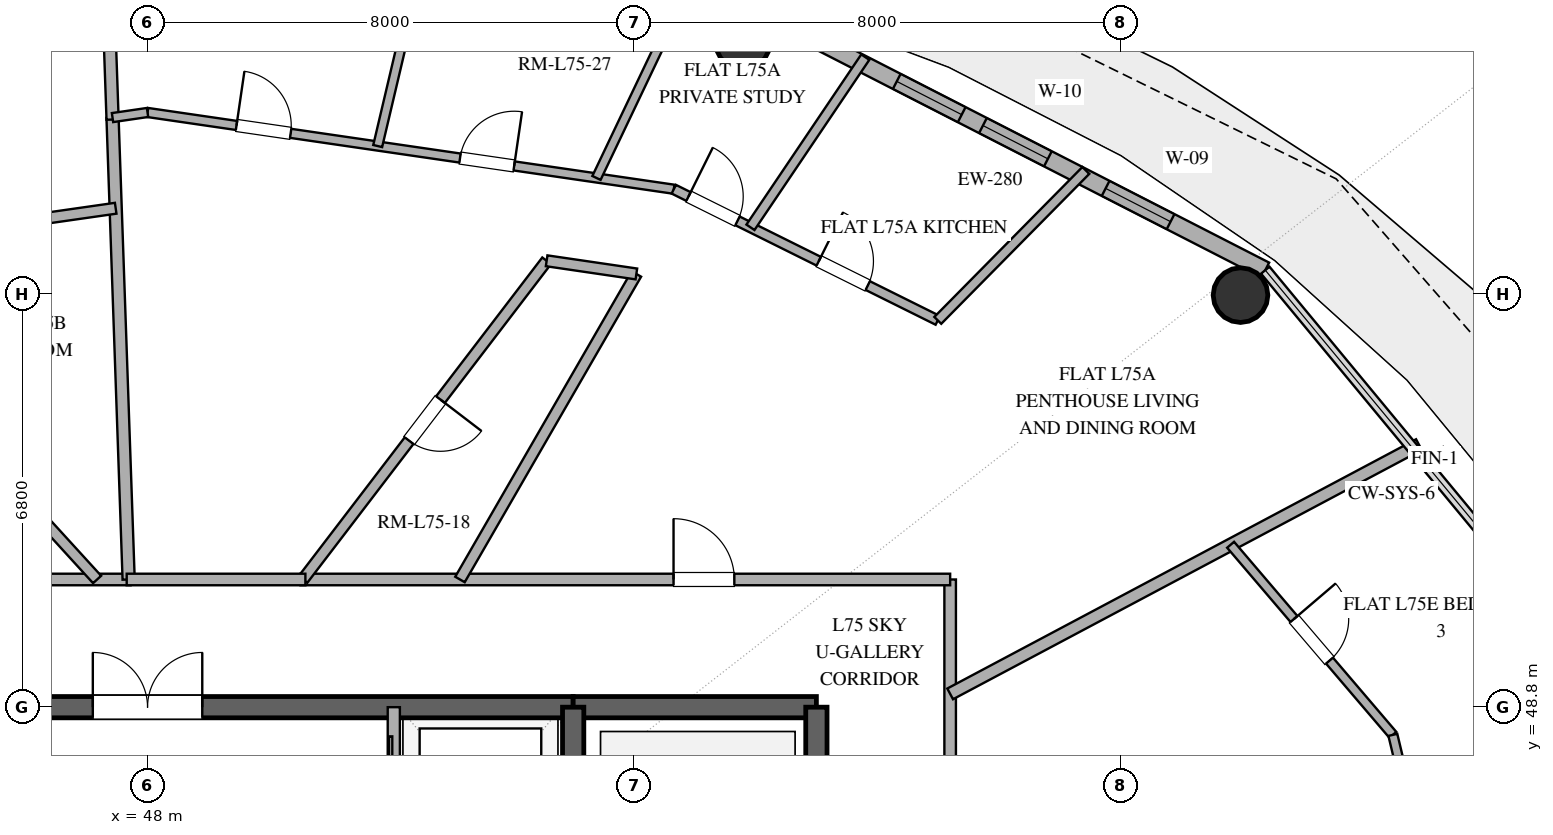
"""IFC4 building model, lengths in metres.
Left out: names, types, materials, properties, quantities, classifications, styles, units other than length and angle.
Written with IfcOpenShell. Run it as: python <this file> out.ifc"""

import sys

from ifc_helpers import new_model, si_unit, direction, frame, frame_2d, origin, origin_2d, place, context, subcontext, project, spatial, rectangle, hollow_circle, extrude, element, fill, save


model = new_model("IFC4")
c1 = context("Model", 3, precision=1e-05, world=origin(), true_north=direction((0.0, 1.0)))
c2 = subcontext(c1, "Body", "Model", "MODEL_VIEW")
j1 = project(units=[si_unit("LENGTHUNIT", "METRE"), si_unit("PLANEANGLEUNIT", "RADIAN")], contexts=[c1])
p1 = place(None, origin())
s1 = spatial("IfcSite", under=j1, at=p1, CompositionType="ELEMENT")
p2 = place(p1, origin())
s2 = spatial("IfcBuilding", under=s1, at=p2, CompositionType="ELEMENT")
p3 = place(p2, frame((0.0, 0.0, 291.0)))
s3 = spatial("IfcBuildingStorey", under=s2, at=p3, CompositionType="ELEMENT", Elevation=291.0)
p4 = place(p3, frame((41.0, 48.8, 0.0), z_axis=(0.0, 0.0, 1.0), x_axis=(1.0, 0.0, 0.0)))
e1 = element("IfcWall", 1, at=p4, inside=s3, PredefinedType="SHEAR", context=c2, shape_type="SweptSolid", body=[
    extrude(rectangle(XDim=14.0, YDim=0.35, at=frame_2d((7.0, 0.0))), origin(), (0.0, 0.0, 1.0), 3.37),
])
p5 = place(p4, frame((6.1, 0.0, 0.0)))
e2 = element("IfcOpeningElement", 2, at=p5, cuts=e1, PredefinedType="OPENING", context=c2, shape_type="SweptSolid", body=[
    extrude(rectangle(XDim=1.8, YDim=2.25, at=frame_2d((0.9, 1.125))), frame((0.0, 0.185, 0.0), z_axis=(0.0, -1.0, 0.0), x_axis=(1.0, 0.0, 0.0)), (0.0, 0.0, 1.0), 0.37),
])
p6 = place(p3, frame((55.0, 48.8, 0.0), z_axis=(0.0, 0.0, 1.0), x_axis=(1.0, 0.0, 0.0)))
e3 = element("IfcWall", 3, at=p6, inside=s3, PredefinedType="SHEAR", context=c2, shape_type="SweptSolid", body=[
    extrude(rectangle(XDim=4.0, YDim=0.35, at=frame_2d((2.0, 0.0))), origin(), (0.0, 0.0, 1.0), 3.37),
])
p7 = place(p3, frame((59.0, 35.2, 0.0), z_axis=(0.0, 0.0, 1.0), x_axis=(0.0, 1.0, 0.0)))
e4 = element("IfcWall", 4, at=p7, inside=s3, PredefinedType="SHEAR", context=c2, shape_type="SweptSolid", body=[
    extrude(rectangle(XDim=13.6, YDim=0.35, at=frame_2d((6.8, 0.0))), origin(), (0.0, 0.0, 1.0), 3.37),
])
p8 = place(p7, frame((1.5, 0.0, 0.0)))
e5 = element("IfcOpeningElement", 5, at=p8, cuts=e4, PredefinedType="OPENING", context=c2, shape_type="SweptSolid", body=[
    extrude(rectangle(XDim=1.2, YDim=2.15, at=frame_2d((0.6, 1.075))), frame((0.0, 0.185, 0.0), z_axis=(0.0, -1.0, 0.0), x_axis=(1.0, 0.0, 0.0)), (0.0, 0.0, 1.0), 0.37),
])
p9 = place(p3, frame((55.0, 35.2, 0.0), z_axis=(0.0, 0.0, 1.0), x_axis=(0.0, 1.0, 0.0)))
e6 = element("IfcWall", 6, at=p9, inside=s3, PredefinedType="SHEAR", context=c2, shape_type="SweptSolid", body=[
    extrude(rectangle(XDim=13.6, YDim=0.35, at=frame_2d((6.8, 0.0))), origin(), (0.0, 0.0, 1.0), 3.37),
])
p10 = place(p9, frame((1.15, 0.0, 0.0)))
e7 = element("IfcOpeningElement", 7, at=p10, cuts=e6, PredefinedType="OPENING", context=c2, shape_type="SweptSolid", body=[
    extrude(rectangle(XDim=1.1, YDim=2.2, at=frame_2d((0.55, 1.1))), frame((0.0, 0.185, 0.0), z_axis=(0.0, -1.0, 0.0), x_axis=(1.0, 0.0, 0.0)), (0.0, 0.0, 1.0), 0.37),
])
for number, where, z_axis, x_axis in (
    (8, (65.975, 55.576, 0.0), (0.0, 0.0, 1.0), (1.0, 0.0, 0.0)),
    (9, (57.791, 59.739, 0.0), (0.0, 0.0, 1.0), (1.0, 0.0, 0.0)),
):
    element("IfcColumn", number, at=place(p3, frame(where, z_axis=z_axis, x_axis=x_axis)), inside=s3, PredefinedType="COLUMN", context=c2, shape_type="SweptSolid", body=[
        extrude(hollow_circle(Radius=0.45, WallThickness=0.025, at=origin_2d()), origin(), (0.0, 0.0, 1.0), 3.37),
    ])
p11 = place(p3, frame((66.383, 55.987, 0.0), z_axis=(0.0, 0.0, 1.0), x_axis=(-0.890007394051, 0.455946091699, 0.0)))
e10 = element("IfcWall", 10, at=p11, inside=s3, PredefinedType="SOLIDWALL", context=c2, shape_type="SweptSolid", body=[
    extrude(rectangle(XDim=9.404, YDim=0.28, at=frame_2d((4.702, 0.0))), origin(), (0.0, 0.0, 1.0), 3.37),
])
p12 = place(p11, frame((1.75, 0.0, 0.85)))
e11 = element("IfcOpeningElement", 11, at=p12, cuts=e10, PredefinedType="OPENING", context=c2, shape_type="SweptSolid", body=[
    extrude(rectangle(XDim=1.2, YDim=1.8, at=frame_2d((0.6, 0.9))), frame((0.0, 0.15, 0.0), z_axis=(0.0, -1.0, 0.0), x_axis=(1.0, 0.0, 0.0)), (0.0, 0.0, 1.0), 0.3),
])
p13 = place(p11, frame((4.017, 0.0, 0.85)))
e12 = element("IfcOpeningElement", 12, at=p13, cuts=e10, PredefinedType="OPENING", context=c2, shape_type="SweptSolid", body=[
    extrude(rectangle(XDim=1.2, YDim=1.6, at=frame_2d((0.6, 0.8))), frame((0.0, 0.15, 0.0), z_axis=(0.0, -1.0, 0.0), x_axis=(1.0, 0.0, 0.0)), (0.0, 0.0, 1.0), 0.3),
])
p14 = place(p11, frame((5.609, 0.0, 0.85)))
e13 = element("IfcOpeningElement", 13, at=p14, cuts=e10, PredefinedType="OPENING", context=c2, shape_type="SweptSolid", body=[
    extrude(rectangle(XDim=1.2, YDim=1.6, at=frame_2d((0.6, 0.8))), frame((0.0, 0.15, 0.0), z_axis=(0.0, -1.0, 0.0), x_axis=(1.0, 0.0, 0.0)), (0.0, 0.0, 1.0), 0.3),
])
p15 = place(p3, frame((52.05, 40.98, 0.0), z_axis=(0.0, 0.0, 1.0), x_axis=(0.0, 1.0, 0.0)))
e14 = element("IfcWall", 14, at=p15, inside=s3, PredefinedType="SOLIDWALL", context=c2, shape_type="SweptSolid", body=[
    extrude(rectangle(XDim=7.82, YDim=0.2, at=frame_2d((3.91, 0.0))), origin(), (0.0, 0.0, 1.0), 2.73),
])
p16 = place(p15, frame((0.65, 0.0, 0.0)))
e15 = element("IfcOpeningElement", 15, at=p16, cuts=e14, PredefinedType="OPENING", context=c2, shape_type="SweptSolid", body=[
    extrude(rectangle(XDim=1.1, YDim=2.2, at=frame_2d((0.55, 1.1))), frame((0.0, 0.11, 0.0), z_axis=(0.0, -1.0, 0.0), x_axis=(1.0, 0.0, 0.0)), (0.0, 0.0, 1.0), 0.22),
])
p17 = place(p15, frame((3.05, 0.0, 0.0)))
e16 = element("IfcOpeningElement", 16, at=p17, cuts=e14, PredefinedType="OPENING", context=c2, shape_type="SweptSolid", body=[
    extrude(rectangle(XDim=1.1, YDim=2.2, at=frame_2d((0.55, 1.1))), frame((0.0, 0.11, 0.0), z_axis=(0.0, -1.0, 0.0), x_axis=(1.0, 0.0, 0.0)), (0.0, 0.0, 1.0), 0.22),
])
p18 = place(p15, frame((5.6, 0.0, 0.0)))
e17 = element("IfcOpeningElement", 17, at=p18, cuts=e14, PredefinedType="OPENING", context=c2, shape_type="SweptSolid", body=[
    extrude(rectangle(XDim=1.2, YDim=2.2, at=frame_2d((0.6, 1.1))), frame((0.0, 0.11, 0.0), z_axis=(0.0, -1.0, 0.0), x_axis=(1.0, 0.0, 0.0)), (0.0, 0.0, 1.0), 0.22),
])
p19 = place(p3, frame((61.2, 50.9, 0.0), z_axis=(0.0, 0.0, 1.0), x_axis=(0.0, -1.0, 0.0)))
e18 = element("IfcWall", 18, at=p19, inside=s3, PredefinedType="PARTITIONING", context=c2, shape_type="SweptSolid", body=[
    extrude(rectangle(XDim=16.9, YDim=0.19, at=frame_2d((8.45, 0.0))), origin(), (0.0, 0.0, 1.0), 2.73),
])
p20 = place(p19, frame((8.873, 0.0, 0.0)))
e19 = element("IfcOpeningElement", 19, at=p20, cuts=e18, PredefinedType="OPENING", context=c2, shape_type="SweptSolid", body=[
    extrude(rectangle(XDim=1.0, YDim=2.2, at=frame_2d((0.5, 1.1))), frame((0.0, 0.105, 0.0), z_axis=(0.0, -1.0, 0.0), x_axis=(1.0, 0.0, 0.0)), (0.0, 0.0, 1.0), 0.21),
])
p21 = place(p3, frame((34.8, 50.9, 0.0), z_axis=(0.0, 0.0, 1.0), x_axis=(1.0, 0.0, 0.0)))
e20 = element("IfcWall", 20, at=p21, inside=s3, PredefinedType="PARTITIONING", context=c2, shape_type="SweptSolid", body=[
    extrude(rectangle(XDim=12.921, YDim=0.19, at=frame_2d((6.46, 0.0))), origin(), (0.0, 0.0, 1.0), 2.73),
])
p22 = place(p21, frame((5.707, 0.0, 0.0)))
e21 = element("IfcOpeningElement", 21, at=p22, cuts=e20, PredefinedType="OPENING", context=c2, shape_type="SweptSolid", body=[
    extrude(rectangle(XDim=1.0, YDim=2.2, at=frame_2d((0.5, 1.1))), frame((0.0, 0.105, 0.0), z_axis=(0.0, -1.0, 0.0), x_axis=(1.0, 0.0, 0.0)), (0.0, 0.0, 1.0), 0.21),
])
p23 = place(p3, frame((50.515, 50.9, 0.0), z_axis=(0.0, 0.0, 1.0), x_axis=(1.0, 0.0, 0.0)))
e22 = element("IfcWall", 22, at=p23, inside=s3, PredefinedType="PARTITIONING", context=c2, shape_type="SweptSolid", body=[
    extrude(rectangle(XDim=10.685, YDim=0.19, at=frame_2d((5.342, 0.0))), origin(), (0.0, 0.0, 1.0), 2.73),
])
p24 = place(p23, frame((6.135, 0.0, 0.0)))
e23 = element("IfcOpeningElement", 23, at=p24, cuts=e22, PredefinedType="OPENING", context=c2, shape_type="SweptSolid", body=[
    extrude(rectangle(XDim=1.0, YDim=2.2, at=frame_2d((0.5, 1.1))), frame((0.0, 0.105, 0.0), z_axis=(0.0, -1.0, 0.0), x_axis=(1.0, 0.0, 0.0)), (0.0, 0.0, 1.0), 0.21),
])
p25 = place(p3, frame((42.278, 56.261, 0.0), z_axis=(0.0, 0.0, 1.0), x_axis=(0.674096276867, -0.73864349284, 0.0)))
e24 = element("IfcWall", 24, at=p25, inside=s3, PredefinedType="PLUMBINGWALL", context=c2, shape_type="SweptSolid", body=[
    extrude(rectangle(XDim=7.258, YDim=0.18, at=frame_2d((3.629, 0.0))), origin(), (0.0, 0.0, 1.0), 2.73),
])
p26 = place(p25, frame((3.204, 0.0, 0.0)))
e25 = element("IfcOpeningElement", 25, at=p26, cuts=e24, PredefinedType="OPENING", context=c2, shape_type="SweptSolid", body=[
    extrude(rectangle(XDim=0.85, YDim=2.1, at=frame_2d((0.425, 1.05))), frame((0.0, 0.1, 0.0), z_axis=(0.0, -1.0, 0.0), x_axis=(1.0, 0.0, 0.0)), (0.0, 0.0, 1.0), 0.2),
])
p27 = place(p3, frame((54.564, 56.141, 0.0), z_axis=(0.0, 0.0, 1.0), x_axis=(-0.607456974677, -0.794352581614, 0.0)))
e26 = element("IfcWall", 26, at=p27, inside=s3, PredefinedType="PLUMBINGWALL", context=c2, shape_type="SweptSolid", body=[
    extrude(rectangle(XDim=6.598, YDim=0.18, at=frame_2d((3.299, 0.0))), origin(), (0.0, 0.0, 1.0), 2.73),
])
p28 = place(p27, frame((2.874, 0.0, 0.0)))
e27 = element("IfcOpeningElement", 27, at=p28, cuts=e26, PredefinedType="OPENING", context=c2, shape_type="SweptSolid", body=[
    extrude(rectangle(XDim=0.85, YDim=2.1, at=frame_2d((0.425, 1.05))), frame((0.0, 0.1, 0.0), z_axis=(0.0, -1.0, 0.0), x_axis=(1.0, 0.0, 0.0)), (0.0, 0.0, 1.0), 0.2),
])
p29 = place(p3, frame((47.689, 50.9, 0.0), z_axis=(0.0, 0.0, 1.0), x_axis=(-0.034882659784, 0.999391414835, 0.0)))
e28 = element("IfcWall", 28, at=p29, inside=s3, PredefinedType="PARTITIONING", context=c2, shape_type="SweptSolid", body=[
    extrude(rectangle(XDim=7.601, YDim=0.2, at=frame_2d((3.8, 0.0))), origin(), (0.0, 0.0, 1.0), 2.73),
])
p30 = place(p3, frame((53.138, 50.9, 0.0), z_axis=(0.0, 0.0, 1.0), x_axis=(0.499985927882, 0.866033528173, 0.0)))
e29 = element("IfcWall", 29, at=p30, inside=s3, PredefinedType="PLUMBINGWALL", context=c2, shape_type="SweptSolid", body=[
    extrude(rectangle(XDim=5.802, YDim=0.18, at=frame_2d((2.901, 0.0))), origin(), (0.0, 0.0, 1.0), 2.73),
])
p31 = place(p3, frame((68.909, 53.118, 0.0), z_axis=(0.0, 0.0, 1.0), x_axis=(-0.882939716422, -0.469486375909, 0.0)))
e30 = element("IfcWall", 30, at=p31, inside=s3, PredefinedType="PARTITIONING", context=c2, shape_type="SweptSolid", body=[
    extrude(rectangle(XDim=8.732, YDim=0.2, at=frame_2d((4.366, 0.0))), origin(), (0.0, 0.0, 1.0), 2.73),
])
p32 = place(p3, frame((47.476, 57.005, 0.0), z_axis=(0.0, 0.0, 1.0), x_axis=(-0.989922511169, -0.141610105153, 0.0)))
e31 = element("IfcWall", 31, at=p32, inside=s3, PredefinedType="PLUMBINGWALL", context=c2, shape_type="SweptSolid", body=[
    extrude(rectangle(XDim=5.251, YDim=0.18, at=frame_2d((2.626, 0.0))), origin(), (0.0, 0.0, 1.0), 2.73),
])
p33 = place(p3, frame((65.812, 51.471, 0.0), z_axis=(0.0, 0.0, 1.0), x_axis=(0.649224667474, -0.760596694145, 0.0)))
e32 = element("IfcWall", 32, at=p33, inside=s3, PredefinedType="PARTITIONING", context=c2, shape_type="SweptSolid", body=[
    extrude(rectangle(XDim=4.11, YDim=0.15, at=frame_2d((2.055, 0.0))), origin(), (0.0, 0.0, 1.0), 2.73),
])
p34 = place(p33, frame((1.605, 0.0, 0.0)))
e33 = element("IfcOpeningElement", 33, at=p34, cuts=e32, PredefinedType="OPENING", context=c2, shape_type="SweptSolid", body=[
    extrude(rectangle(XDim=0.9, YDim=2.1, at=frame_2d((0.45, 1.05))), frame((0.0, 0.085, 0.0), z_axis=(0.0, -1.0, 0.0), x_axis=(1.0, 0.0, 0.0)), (0.0, 0.0, 1.0), 0.17),
])
p35 = place(p3, frame((48.0, 58.58, 0.0), z_axis=(0.0, 0.0, 1.0), x_axis=(0.989536136377, -0.144285254977, 0.0)))
e34 = element("IfcWall", 34, at=p35, inside=s3, PredefinedType="PARTITIONING", context=c2, shape_type="SweptSolid", body=[
    extrude(rectangle(XDim=8.746, YDim=0.15, at=frame_2d((4.373, 0.0))), origin(), (0.0, 0.0, 1.0), 2.73),
])
p36 = place(p35, frame((1.479, 0.0, 0.0)))
e35 = element("IfcOpeningElement", 35, at=p36, cuts=e34, PredefinedType="OPENING", context=c2, shape_type="SweptSolid", body=[
    extrude(rectangle(XDim=0.9, YDim=2.1, at=frame_2d((0.45, 1.05))), frame((0.0, 0.085, 0.0), z_axis=(0.0, -1.0, 0.0), x_axis=(1.0, 0.0, 0.0)), (0.0, 0.0, 1.0), 0.17),
])
p37 = place(p35, frame((5.193, 0.0, 0.0)))
e36 = element("IfcOpeningElement", 36, at=p37, cuts=e34, PredefinedType="OPENING", context=c2, shape_type="SweptSolid", body=[
    extrude(rectangle(XDim=0.9, YDim=2.1, at=frame_2d((0.45, 1.05))), frame((0.0, 0.085, 0.0), z_axis=(0.0, -1.0, 0.0), x_axis=(1.0, 0.0, 0.0)), (0.0, 0.0, 1.0), 0.17),
])
p38 = place(p3, frame((68.481, 48.345, 0.0), z_axis=(0.0, 0.0, 1.0), x_axis=(0.232298462197, -0.972644551962, 0.0)))
e37 = element("IfcWall", 37, at=p38, inside=s3, PredefinedType="PARTITIONING", context=c2, shape_type="SweptSolid", body=[
    extrude(rectangle(XDim=6.523, YDim=0.15, at=frame_2d((3.262, 0.0))), origin(), (0.0, 0.0, 1.0), 2.73),
])
p39 = place(p3, frame((56.655, 57.318, 0.0), z_axis=(0.0, 0.0, 1.0), x_axis=(0.895572412961, -0.44491578208, 0.0)))
e38 = element("IfcWall", 38, at=p39, inside=s3, PredefinedType="PLUMBINGWALL", context=c2, shape_type="SweptSolid", body=[
    extrude(rectangle(XDim=4.848, YDim=0.16, at=frame_2d((2.424, 0.0))), origin(), (0.0, 0.0, 1.0), 2.73),
])
p40 = place(p39, frame((2.662, 0.0, 0.0)))
e39 = element("IfcOpeningElement", 39, at=p40, cuts=e38, PredefinedType="OPENING", context=c2, shape_type="SweptSolid", body=[
    extrude(rectangle(XDim=0.9, YDim=2.1, at=frame_2d((0.45, 1.05))), frame((0.0, 0.09, 0.0), z_axis=(0.0, -1.0, 0.0), x_axis=(1.0, 0.0, 0.0)), (0.0, 0.0, 1.0), 0.18),
])
p41 = place(p39, frame((0.27, 0.0, 0.0)))
e40 = element("IfcOpeningElement", 40, at=p41, cuts=e38, PredefinedType="OPENING", context=c2, shape_type="SweptSolid", body=[
    extrude(rectangle(XDim=0.9, YDim=2.1, at=frame_2d((0.45, 1.05))), frame((0.0, 0.09, 0.0), z_axis=(0.0, -1.0, 0.0), x_axis=(1.0, 0.0, 0.0)), (0.0, 0.0, 1.0), 0.18),
])
p42 = place(p3, frame((60.997, 55.161, 0.0), z_axis=(0.0, 0.0, 1.0), x_axis=(0.702618919802, 0.711566338113, 0.0)))
e41 = element("IfcWall", 41, at=p42, inside=s3, PredefinedType="PLUMBINGWALL", context=c2, shape_type="SweptSolid", body=[
    extrude(rectangle(XDim=3.465, YDim=0.16, at=frame_2d((1.733, 0.0))), origin(), (0.0, 0.0, 1.0), 2.73),
])
p43 = place(p3, frame((56.842, 60.566, 0.0), z_axis=(0.0, 0.0, 1.0), x_axis=(-0.429975480416, -0.902840565239, 0.0)))
e42 = element("IfcWall", 42, at=p43, inside=s3, PredefinedType="PARTITIONING", context=c2, shape_type="SweptSolid", body=[
    extrude(rectangle(XDim=3.393, YDim=0.15, at=frame_2d((1.696, 0.0))), origin(), (0.0, 0.0, 1.0), 2.73),
])
p44 = place(p3, frame((59.804, 59.49, 0.0), z_axis=(0.0, 0.0, 1.0), x_axis=(-0.559397095435, -0.828899806743, 0.0)))
e43 = element("IfcWall", 43, at=p44, inside=s3, PredefinedType="PLUMBINGWALL", context=c2, shape_type="SweptSolid", body=[
    extrude(rectangle(XDim=3.376, YDim=0.16, at=frame_2d((1.688, 0.0))), origin(), (0.0, 0.0, 1.0), 2.73),
])
p45 = place(p3, frame((47.309, 61.797, 0.0), z_axis=(0.0, 0.0, 1.0), x_axis=(0.034921182562, -0.999390069497, 0.0)))
e44 = element("IfcWall", 44, at=p45, inside=s3, PredefinedType="PARTITIONING", context=c2, shape_type="SweptSolid", body=[
    extrude(rectangle(XDim=3.335, YDim=0.2, at=frame_2d((1.667, 0.0))), origin(), (0.0, 0.0, 1.0), 2.73),
])
p46 = place(p3, frame((51.785, 58.028, 0.0), z_axis=(0.0, 0.0, 1.0), x_axis=(0.2298279545, 0.973231273301, 0.0)))
e45 = element("IfcWall", 45, at=p46, inside=s3, PredefinedType="PARTITIONING", context=c2, shape_type="SweptSolid", body=[
    extrude(rectangle(XDim=3.278, YDim=0.15, at=frame_2d((1.639, 0.0))), origin(), (0.0, 0.0, 1.0), 2.73),
])
p47 = place(p3, frame((47.657, 50.9, 0.0), z_axis=(0.0, 0.0, 1.0), x_axis=(1.0, 0.0, 0.0)))
e46 = element("IfcWall", 46, at=p47, inside=s3, PredefinedType="PARTITIONING", context=c2, shape_type="SweptSolid", body=[
    extrude(rectangle(XDim=2.939, YDim=0.19, at=frame_2d((1.469, 0.0))), origin(), (0.0, 0.0, 1.0), 2.73),
])
p48 = place(p3, frame((56.039, 55.925, 0.0), z_axis=(0.0, 0.0, 1.0), x_axis=(-0.989402061703, 0.14520179165, 0.0)))
e47 = element("IfcWall", 47, at=p48, inside=s3, PredefinedType="PLUMBINGWALL", context=c2, shape_type="SweptSolid", body=[
    extrude(rectangle(XDim=1.491, YDim=0.18, at=frame_2d((0.746, 0.0))), origin(), (0.0, 0.0, 1.0), 2.73),
])
p49 = place(p3, frame((47.424, 58.496, 0.0), z_axis=(0.0, 0.0, 1.0), x_axis=(0.989534228924, 0.144298336053, 0.0)))
e48 = element("IfcWall", 48, at=p49, inside=s3, PredefinedType="PARTITIONING", context=c2, shape_type="SweptSolid", body=[
    extrude(rectangle(XDim=0.582, YDim=0.15, at=frame_2d((0.291, 0.0))), origin(), (0.0, 0.0, 1.0), 2.73),
])
p50 = place(p12, origin())
e49 = element("IfcWindow", 49, at=p50, inside=s3, PartitioningType="SINGLE_PANEL", PredefinedType="WINDOW", context=c2, shape_type="SweptSolid", body=[
    extrude(rectangle(XDim=1.2, YDim=1.8, at=frame_2d((0.6, 0.9))), frame((0.0, 0.03, 0.0), z_axis=(0.0, -1.0, 0.0), x_axis=(1.0, 0.0, 0.0)), (0.0, 0.0, 1.0), 0.06),
])
fill(e11, e49)
p51 = place(p13, origin())
e50 = element("IfcWindow", 50, at=p51, inside=s3, PartitioningType="SINGLE_PANEL", PredefinedType="WINDOW", context=c2, shape_type="SweptSolid", body=[
    extrude(rectangle(XDim=1.2, YDim=1.6, at=frame_2d((0.6, 0.8))), frame((0.0, 0.03, 0.0), z_axis=(0.0, -1.0, 0.0), x_axis=(1.0, 0.0, 0.0)), (0.0, 0.0, 1.0), 0.06),
])
fill(e12, e50)
p52 = place(p14, origin())
e51 = element("IfcWindow", 51, at=p52, inside=s3, PartitioningType="SINGLE_PANEL", PredefinedType="WINDOW", context=c2, shape_type="SweptSolid", body=[
    extrude(rectangle(XDim=1.2, YDim=1.6, at=frame_2d((0.6, 0.8))), frame((0.0, 0.03, 0.0), z_axis=(0.0, -1.0, 0.0), x_axis=(1.0, 0.0, 0.0)), (0.0, 0.0, 1.0), 0.06),
])
fill(e13, e51)
p53 = place(p5, origin())
e52 = element("IfcDoor", 52, at=p53, inside=s3, OperationType="DOUBLE_DOOR_SINGLE_SWING", PredefinedType="DOOR", context=c2, shape_type="SweptSolid", body=[
    extrude(rectangle(XDim=1.8, YDim=2.25, at=frame_2d((0.9, 1.125))), frame((0.0, 0.025, 0.0), z_axis=(0.0, -1.0, 0.0), x_axis=(1.0, 0.0, 0.0)), (0.0, 0.0, 1.0), 0.05),
])
fill(e2, e52)
p54 = place(p24, origin())
e53 = element("IfcDoor", 53, at=p54, inside=s3, OperationType="SINGLE_SWING_LEFT", PredefinedType="DOOR", context=c2, shape_type="SweptSolid", body=[
    extrude(rectangle(XDim=1.0, YDim=2.2, at=frame_2d((0.5, 1.1))), frame((0.0, 0.025, 0.0), z_axis=(0.0, -1.0, 0.0), x_axis=(1.0, 0.0, 0.0)), (0.0, 0.0, 1.0), 0.05),
])
fill(e23, e53)
p55 = place(p28, origin())
e54 = element("IfcDoor", 54, at=p55, inside=s3, OperationType="SINGLE_SWING_LEFT", PredefinedType="DOOR", context=c2, shape_type="SweptSolid", body=[
    extrude(rectangle(XDim=0.85, YDim=2.1, at=frame_2d((0.425, 1.05))), frame((0.0, 0.025, 0.0), z_axis=(0.0, -1.0, 0.0), x_axis=(1.0, 0.0, 0.0)), (0.0, 0.0, 1.0), 0.05),
])
fill(e27, e54)
p56 = place(p34, origin())
e55 = element("IfcDoor", 55, at=p56, inside=s3, OperationType="SINGLE_SWING_LEFT", PredefinedType="DOOR", context=c2, shape_type="SweptSolid", body=[
    extrude(rectangle(XDim=0.9, YDim=2.1, at=frame_2d((0.45, 1.05))), frame((0.0, 0.025, 0.0), z_axis=(0.0, -1.0, 0.0), x_axis=(1.0, 0.0, 0.0)), (0.0, 0.0, 1.0), 0.05),
])
fill(e33, e55)
p57 = place(p36, origin())
e56 = element("IfcDoor", 56, at=p57, inside=s3, OperationType="SINGLE_SWING_LEFT", PredefinedType="DOOR", context=c2, shape_type="SweptSolid", body=[
    extrude(rectangle(XDim=0.9, YDim=2.1, at=frame_2d((0.45, 1.05))), frame((0.0, 0.025, 0.0), z_axis=(0.0, -1.0, 0.0), x_axis=(1.0, 0.0, 0.0)), (0.0, 0.0, 1.0), 0.05),
])
fill(e35, e56)
p58 = place(p37, origin())
e57 = element("IfcDoor", 57, at=p58, inside=s3, OperationType="SINGLE_SWING_RIGHT", PredefinedType="DOOR", context=c2, shape_type="SweptSolid", body=[
    extrude(rectangle(XDim=0.9, YDim=2.1, at=frame_2d((0.45, 1.05))), frame((0.0, 0.025, 0.0), z_axis=(0.0, -1.0, 0.0), x_axis=(1.0, 0.0, 0.0)), (0.0, 0.0, 1.0), 0.05),
])
fill(e36, e57)
p59 = place(p40, origin())
e58 = element("IfcDoor", 58, at=p59, inside=s3, OperationType="SINGLE_SWING_LEFT", PredefinedType="DOOR", context=c2, shape_type="SweptSolid", body=[
    extrude(rectangle(XDim=0.9, YDim=2.1, at=frame_2d((0.45, 1.05))), frame((0.0, 0.025, 0.0), z_axis=(0.0, -1.0, 0.0), x_axis=(1.0, 0.0, 0.0)), (0.0, 0.0, 1.0), 0.05),
])
fill(e39, e58)
p60 = place(p41, origin())
e59 = element("IfcDoor", 59, at=p60, inside=s3, OperationType="SINGLE_SWING_LEFT", PredefinedType="DOOR", context=c2, shape_type="SweptSolid", body=[
    extrude(rectangle(XDim=0.9, YDim=2.1, at=frame_2d((0.45, 1.05))), frame((0.0, 0.025, 0.0), z_axis=(0.0, -1.0, 0.0), x_axis=(1.0, 0.0, 0.0)), (0.0, 0.0, 1.0), 0.05),
])
fill(e40, e59)
save(model, sys.argv[1])
